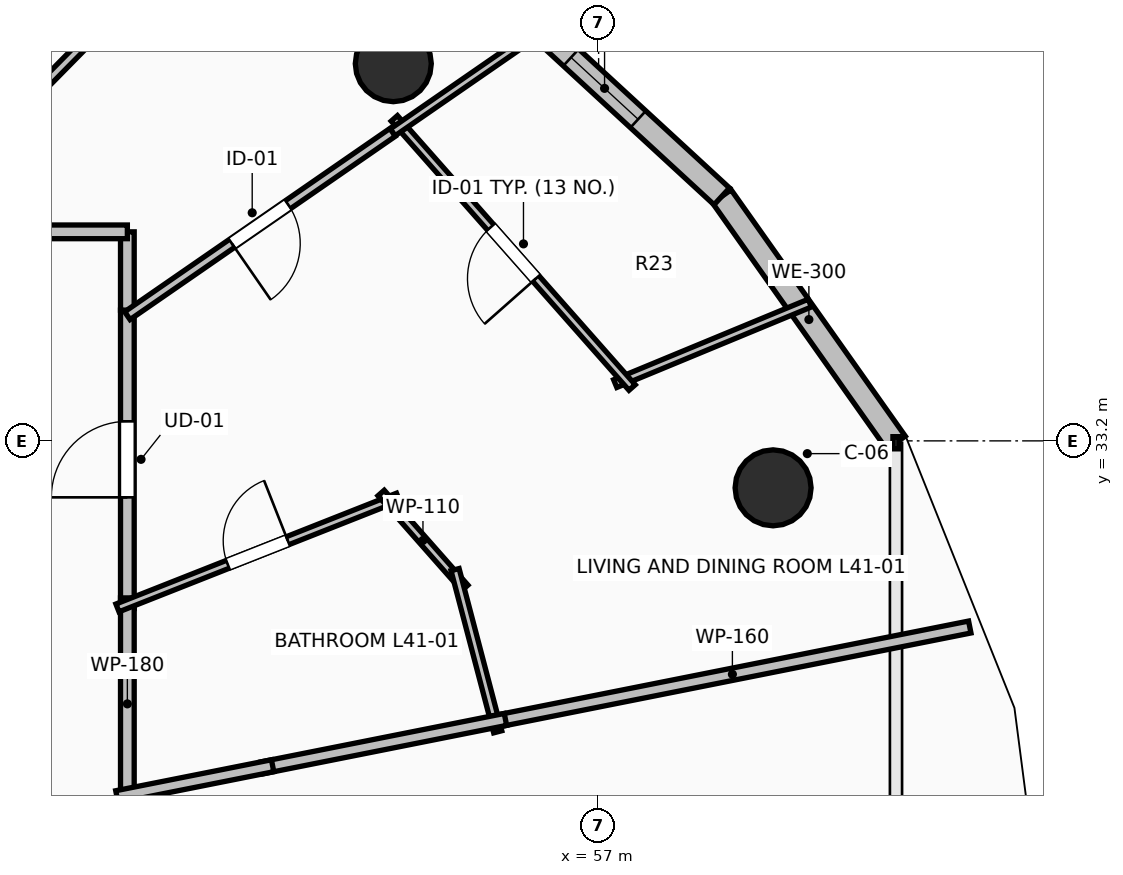
"""IFC4 building model, lengths in metres.
Left out: names, types, materials, properties, quantities, classifications, styles, units other than length and angle.
Written with IfcOpenShell. Run it as: python <this file> out.ifc"""

import sys

from ifc_helpers import new_model, si_unit, direction, frame, frame_2d, origin, origin_2d, place, context, subcontext, project, spatial, rectangle, circle, extrude, element, fill, save


model = new_model("IFC4")
c1 = context("Model", 3, precision=1e-05, world=origin(), true_north=direction((0.0, 1.0)))
c2 = subcontext(c1, "Body", "Model", "MODEL_VIEW")
j1 = project(units=[si_unit("LENGTHUNIT", "METRE"), si_unit("PLANEANGLEUNIT", "RADIAN")], contexts=[c1])
p1 = place(None, origin())
s1 = spatial("IfcSite", under=j1, at=p1, CompositionType="ELEMENT")
p2 = place(p1, origin())
s2 = spatial("IfcBuilding", under=s1, at=p2, CompositionType="ELEMENT")
p3 = place(p2, frame((0.0, 0.0, 153.6)))
s3 = spatial("IfcBuildingStorey", under=s2, at=p3, CompositionType="ELEMENT", Elevation=153.6)
for number, where, z_axis, x_axis in (
    (1, (59.295, 32.582, 0.0), (0.0, 0.0, 1.0), (0.924, 0.383, 0.0)),
    (2, (54.299, 38.162, 0.0), (0.0, 0.0, 1.0), (0.707, 0.707, 0.0)),
):
    element("IfcColumn", number, at=place(p3, frame(where, z_axis=z_axis, x_axis=x_axis)), inside=s3, PredefinedType="COLUMN", context=c2, shape_type="SweptSolid", body=[
        extrude(circle(Radius=0.5, at=origin_2d()), origin(), (0.0, 0.0, 1.0), 3.5),
    ])
p4 = place(p3, frame((60.912, 33.175, 0.0), z_axis=(0.0, 0.0, 1.0), x_axis=(-0.577269753207, 0.816553508371, 0.0)))
e3 = element("IfcWall", 3, at=p4, inside=s3, PredefinedType="STANDARD", context=c2, shape_type="SweptSolid", body=[
    extrude(rectangle(XDim=3.97, YDim=0.3, at=frame_2d((1.985, 0.0))), origin(), (0.0, 0.0, 1.0), 3.24),
])
p5 = place(p3, frame((58.62, 36.417, 0.0), z_axis=(0.0, 0.0, 1.0), x_axis=(-0.735477154165, 0.677549522693, 0.0)))
e4 = element("IfcWall", 4, at=p5, inside=s3, PredefinedType="STANDARD", context=c2, shape_type="SweptSolid", body=[
    extrude(rectangle(XDim=4.194, YDim=0.3, at=frame_2d((2.097, 0.0))), origin(), (0.0, 0.0, 1.0), 3.24),
])
p6 = place(p5, frame((1.497, 0.0, 0.85)))
e5 = element("IfcOpeningElement", 5, at=p6, cuts=e4, PredefinedType="OPENING", context=c2, shape_type="SweptSolid", body=[
    extrude(rectangle(XDim=1.2, YDim=2.1, at=frame_2d((0.6, 1.05))), frame((0.0, 0.165, 0.0), z_axis=(0.0, -1.0, 0.0), x_axis=(1.0, 0.0, 0.0)), (0.0, 0.0, 1.0), 0.33),
])
p7 = place(p3, frame((50.8, 30.994, 0.0), z_axis=(0.0, 0.0, 1.0), x_axis=(0.0, 1.0, 0.0)))
e6 = element("IfcWall", 6, at=p7, inside=s3, PredefinedType="PARTITIONING", context=c2, shape_type="SweptSolid", body=[
    extrude(rectangle(XDim=3.926, YDim=0.18, at=frame_2d((1.963, 0.0))), origin(), (0.0, 0.0, 1.0), 2.432),
])
p8 = place(p7, frame((1.463, 0.0, 0.0)))
e7 = element("IfcOpeningElement", 7, at=p8, cuts=e6, PredefinedType="OPENING", context=c2, shape_type="SweptSolid", body=[
    extrude(rectangle(XDim=1.0, YDim=2.15, at=frame_2d((0.5, 1.075))), frame((0.0, 0.105, 0.0), z_axis=(0.0, -1.0, 0.0), x_axis=(1.0, 0.0, 0.0)), (0.0, 0.0, 1.0), 0.21),
])
p9 = place(p3, frame((50.8, 28.346, 0.0), z_axis=(0.0, 0.0, 1.0), x_axis=(0.0, 1.0, 0.0)))
e8 = element("IfcWall", 8, at=p9, inside=s3, PredefinedType="PARTITIONING", context=c2, shape_type="SweptSolid", body=[
    extrude(rectangle(XDim=2.788, YDim=0.18, at=frame_2d((1.394, 0.0))), origin(), (0.0, 0.0, 1.0), 3.24),
])
p10 = place(p3, frame((50.8, 34.92, 0.0), z_axis=(0.0, 0.0, 1.0), x_axis=(0.0, 1.0, 0.0)))
e9 = element("IfcWall", 9, at=p10, inside=s3, PredefinedType="PARTITIONING", context=c2, shape_type="SweptSolid", body=[
    extrude(rectangle(XDim=1.03, YDim=0.18, at=frame_2d((0.515, 0.0))), origin(), (0.0, 0.0, 1.0), 2.432),
])
p11 = place(p3, frame((50.8, 35.95, 0.0), z_axis=(0.0, 0.0, 1.0), x_axis=(-1.0, 0.0, 0.0)))
e10 = element("IfcWall", 10, at=p11, inside=s3, PredefinedType="PARTITIONING", context=c2, shape_type="SweptSolid", body=[
    extrude(rectangle(XDim=3.065, YDim=0.18, at=frame_2d((1.532, 0.0))), origin(), (0.0, 0.0, 1.0), 2.432),
])
p12 = place(p3, frame((50.67, 31.003, 0.0), z_axis=(0.0, 0.0, 1.0), x_axis=(0.930092731386, 0.367324803169, 0.0)))
e11 = element("IfcWall", 11, at=p12, inside=s3, PredefinedType="PARTITIONING", context=c2, shape_type="SweptSolid", body=[
    extrude(rectangle(XDim=3.969, YDim=0.11, at=frame_2d((1.984, 0.0))), origin(), (0.0, 0.0, 1.0), 2.886),
])
p13 = place(p12, frame((1.559, 0.0, 0.0)))
e12 = element("IfcOpeningElement", 12, at=p13, cuts=e11, PredefinedType="OPENING", context=c2, shape_type="SweptSolid", body=[
    extrude(rectangle(XDim=0.85, YDim=2.1, at=frame_2d((0.425, 1.05))), frame((0.0, 0.07, 0.0), z_axis=(0.0, -1.0, 0.0), x_axis=(1.0, 0.0, 0.0)), (0.0, 0.0, 1.0), 0.14),
])
p14 = place(p3, frame((54.138, 32.514, 0.0), z_axis=(0.0, 0.0, 1.0), x_axis=(0.661645897528, -0.749816448396, 0.0)))
e13 = element("IfcWall", 13, at=p14, inside=s3, PredefinedType="PARTITIONING", context=c2, shape_type="SweptSolid", body=[
    extrude(rectangle(XDim=1.664, YDim=0.11, at=frame_2d((0.832, 0.0))), origin(), (0.0, 0.0, 1.0), 3.24),
])
p15 = place(p3, frame((55.111, 31.506, 0.0), z_axis=(0.0, 0.0, 1.0), x_axis=(0.254389812051, -0.967101764823, 0.0)))
e14 = element("IfcWall", 14, at=p15, inside=s3, PredefinedType="PARTITIONING", context=c2, shape_type="SweptSolid", body=[
    extrude(rectangle(XDim=2.206, YDim=0.11, at=frame_2d((1.103, 0.0))), origin(), (0.0, 0.0, 1.0), 3.24),
])
p16 = place(p3, frame((59.778, 35.012, 0.0), z_axis=(0.0, 0.0, 1.0), x_axis=(-0.924067287951, -0.382229835751, 0.0)))
e15 = element("IfcWall", 15, at=p16, inside=s3, PredefinedType="PARTITIONING", context=c2, shape_type="SweptSolid", body=[
    extrude(rectangle(XDim=2.77, YDim=0.11, at=frame_2d((1.385, 0.0))), origin(), (0.0, 0.0, 1.0), 2.728),
])
p17 = place(p3, frame((57.441, 33.902, 0.0), z_axis=(0.0, 0.0, 1.0), x_axis=(-0.662122223318, 0.749395864272, 0.0)))
e16 = element("IfcWall", 16, at=p17, inside=s3, PredefinedType="PARTITIONING", context=c2, shape_type="SweptSolid", body=[
    extrude(rectangle(XDim=4.725, YDim=0.11, at=frame_2d((2.362, 0.0))), origin(), (0.0, 0.0, 1.0), 3.24),
])
p18 = place(p17, frame((1.912, 0.0, 0.0)))
e17 = element("IfcOpeningElement", 17, at=p18, cuts=e16, PredefinedType="OPENING", context=c2, shape_type="SweptSolid", body=[
    extrude(rectangle(XDim=0.9, YDim=2.1, at=frame_2d((0.45, 1.05))), frame((0.0, 0.07, 0.0), z_axis=(0.0, -1.0, 0.0), x_axis=(1.0, 0.0, 0.0)), (0.0, 0.0, 1.0), 0.14),
])
p19 = place(p3, frame((54.29, 37.258, 0.0), z_axis=(0.0, 0.0, 1.0), x_axis=(0.822632807799, 0.568573006335, 0.0)))
e18 = element("IfcWall", 18, at=p19, inside=s3, PredefinedType="PARTITIONING", context=c2, shape_type="SweptSolid", body=[
    extrude(rectangle(XDim=2.512, YDim=0.11, at=frame_2d((1.256, 0.0))), origin(), (0.0, 0.0, 1.0), 2.728),
])
p20 = place(p3, frame((54.29, 37.259, 0.0), z_axis=(0.0, 0.0, 1.0), x_axis=(-0.822672586971, -0.568515448027, 0.0)))
e19 = element("IfcWall", 19, at=p20, inside=s3, PredefinedType="PARTITIONING", context=c2, shape_type="SweptSolid", body=[
    extrude(rectangle(XDim=4.242, YDim=0.125, at=frame_2d((2.121, 0.0))), origin(), (0.0, 0.0, 1.0), 2.432),
])
p21 = place(p20, frame((1.671, 0.0, 0.0)))
e20 = element("IfcOpeningElement", 20, at=p21, cuts=e19, PredefinedType="OPENING", context=c2, shape_type="SweptSolid", body=[
    extrude(rectangle(XDim=0.9, YDim=2.1, at=frame_2d((0.45, 1.05))), frame((0.0, 0.077, 0.0), z_axis=(0.0, -1.0, 0.0), x_axis=(1.0, 0.0, 0.0)), (0.0, 0.0, 1.0), 0.155),
])
p22 = place(p3, frame((55.637, 29.508, 0.0), z_axis=(0.0, 0.0, 1.0), x_axis=(0.98077041661, 0.19516503248, 0.0)))
e21 = element("IfcWall", 21, at=p22, inside=s3, PredefinedType="PARTITIONING", context=c2, shape_type="SweptSolid", body=[
    extrude(rectangle(XDim=6.369, YDim=0.16, at=frame_2d((3.184, 0.0))), origin(), (0.0, 0.0, 1.0), 2.728),
])
p23 = place(p3, frame((52.574, 28.899, 0.0), z_axis=(0.0, 0.0, 1.0), x_axis=(0.980781574696, 0.195108950939, 0.0)))
e22 = element("IfcWall", 22, at=p23, inside=s3, PredefinedType="PARTITIONING", context=c2, shape_type="SweptSolid", body=[
    extrude(rectangle(XDim=3.263, YDim=0.16, at=frame_2d((1.632, 0.0))), origin(), (0.0, 0.0, 1.0), 2.886),
])
p24 = place(p3, frame((50.663, 28.519, 0.0), z_axis=(0.0, 0.0, 1.0), x_axis=(0.980804842296, 0.194991951961, 0.0)))
e23 = element("IfcWall", 23, at=p24, inside=s3, PredefinedType="PARTITIONING", context=c2, shape_type="SweptSolid", body=[
    extrude(rectangle(XDim=2.088, YDim=0.16, at=frame_2d((1.044, 0.0))), origin(), (0.0, 0.0, 1.0), 2.886),
])
p25 = place(p3, frame((52.751, 40.985, 0.0), z_axis=(0.0, 0.0, 1.0), x_axis=(-0.701486551238, -0.712682691268, 0.0)))
e24 = element("IfcWall", 24, at=p25, inside=s3, PredefinedType="PARTITIONING", context=c2, shape_type="SweptSolid", body=[
    extrude(rectangle(XDim=7.065, YDim=0.125, at=frame_2d((3.533, 0.0))), origin(), (0.0, 0.0, 1.0), 2.432),
])
p26 = place(p6, origin())
e25 = element("IfcWindow", 25, at=p26, inside=s3, PartitioningType="SINGLE_PANEL", PredefinedType="WINDOW", context=c2, shape_type="SweptSolid", body=[
    extrude(rectangle(XDim=1.2, YDim=2.1, at=frame_2d((0.6, 1.05))), frame((0.0, 0.03, 0.0), z_axis=(0.0, -1.0, 0.0), x_axis=(1.0, 0.0, 0.0)), (0.0, 0.0, 1.0), 0.06),
])
fill(e5, e25)
p27 = place(p8, origin())
e26 = element("IfcDoor", 26, at=p27, inside=s3, OperationType="SINGLE_SWING_LEFT", PredefinedType="DOOR", context=c2, shape_type="SweptSolid", body=[
    extrude(rectangle(XDim=1.0, YDim=2.15, at=frame_2d((0.5, 1.075))), frame((0.0, 0.025, 0.0), z_axis=(0.0, -1.0, 0.0), x_axis=(1.0, 0.0, 0.0)), (0.0, 0.0, 1.0), 0.05),
])
fill(e7, e26)
p28 = place(p13, origin())
e27 = element("IfcDoor", 27, at=p28, inside=s3, OperationType="SINGLE_SWING_RIGHT", PredefinedType="DOOR", context=c2, shape_type="SweptSolid", body=[
    extrude(rectangle(XDim=0.85, YDim=2.1, at=frame_2d((0.425, 1.05))), frame((0.0, 0.025, 0.0), z_axis=(0.0, -1.0, 0.0), x_axis=(1.0, 0.0, 0.0)), (0.0, 0.0, 1.0), 0.05),
])
fill(e12, e27)
p29 = place(p18, origin())
e28 = element("IfcDoor", 28, at=p29, inside=s3, OperationType="SINGLE_SWING_LEFT", PredefinedType="DOOR", context=c2, shape_type="SweptSolid", body=[
    extrude(rectangle(XDim=0.9, YDim=2.1, at=frame_2d((0.45, 1.05))), frame((0.0, 0.025, 0.0), z_axis=(0.0, -1.0, 0.0), x_axis=(1.0, 0.0, 0.0)), (0.0, 0.0, 1.0), 0.05),
])
fill(e17, e28)
p30 = place(p21, origin())
e29 = element("IfcDoor", 29, at=p30, inside=s3, OperationType="SINGLE_SWING_RIGHT", PredefinedType="DOOR", context=c2, shape_type="SweptSolid", body=[
    extrude(rectangle(XDim=0.9, YDim=2.1, at=frame_2d((0.45, 1.05))), frame((0.0, 0.025, 0.0), z_axis=(0.0, -1.0, 0.0), x_axis=(1.0, 0.0, 0.0)), (0.0, 0.0, 1.0), 0.05),
])
fill(e20, e29)
save(model, sys.argv[1])
